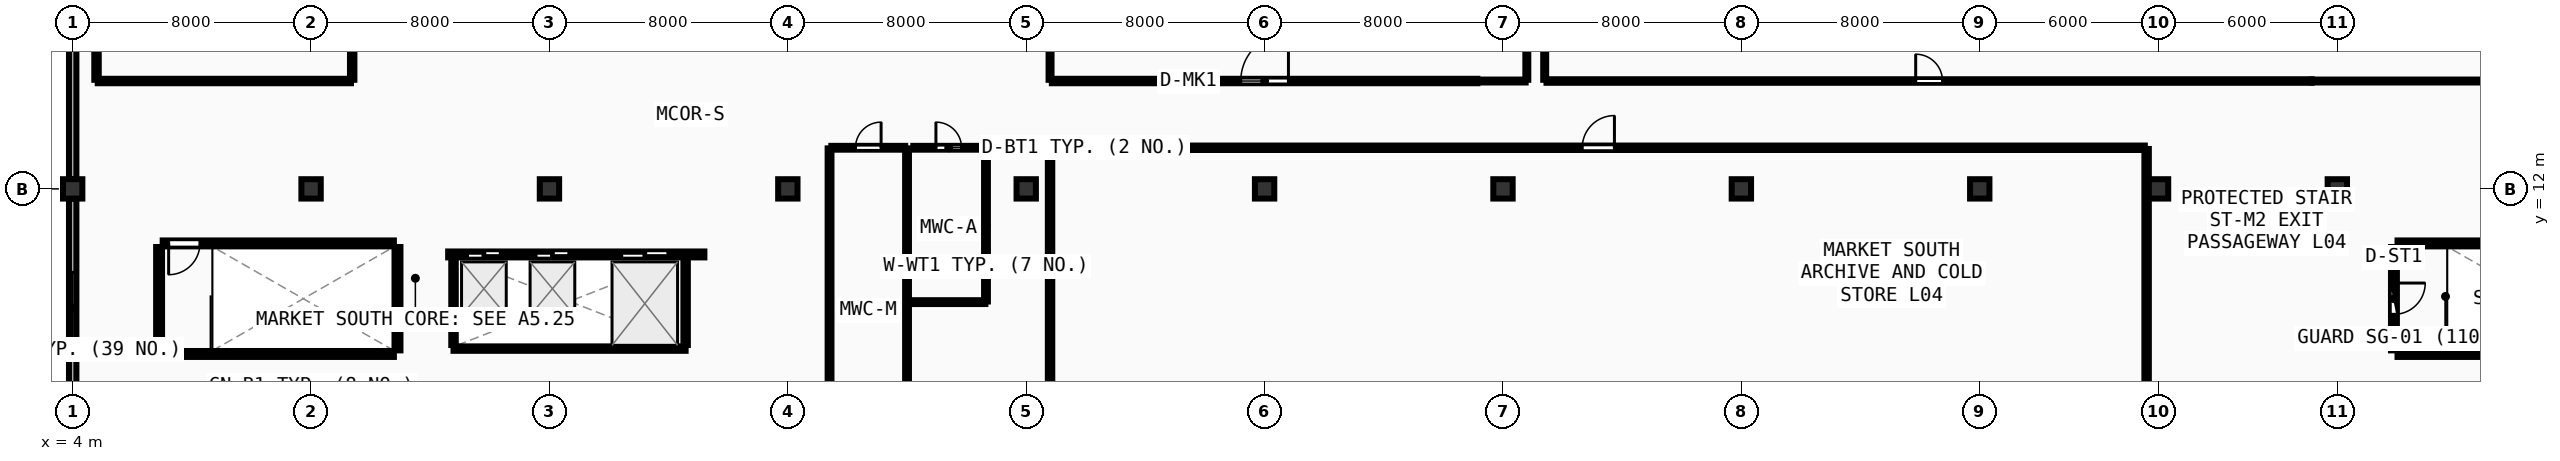
"""IFC4 building model, lengths in metres.
Left out: names, types, materials, properties, quantities, classifications, styles, units other than length and angle.
Written with IfcOpenShell. Run it as: python <this file> out.ifc"""

import sys

from ifc_helpers import new_model, si_unit, direction, frame, frame_2d, origin, origin_2d, place, context, subcontext, project, spatial, rectangle, extrude, element, fill, save


model = new_model("IFC4")
c1 = context("Model", 3, precision=1e-05, world=origin(), true_north=direction((0.0, 1.0)))
c2 = subcontext(c1, "Body", "Model", "MODEL_VIEW")
j1 = project(units=[si_unit("LENGTHUNIT", "METRE"), si_unit("PLANEANGLEUNIT", "RADIAN")], contexts=[c1])
p1 = place(None, origin())
s1 = spatial("IfcSite", under=j1, at=p1, CompositionType="ELEMENT")
p2 = place(p1, origin())
s2 = spatial("IfcBuilding", under=s1, at=p2, CompositionType="ELEMENT")
p3 = place(p2, frame((0.0, 0.0, 18.0)))
s3 = spatial("IfcBuildingStorey", under=s2, at=p3, CompositionType="ELEMENT", Elevation=18.0)
for number, where, z_axis, x_axis in (
    (1, (4.0, 12.0, 0.0), (0.0, 0.0, 1.0), (1.0, 0.0, 0.0)),
    (2, (12.0, 12.0, 0.0), (0.0, 0.0, 1.0), (1.0, 0.0, 0.0)),
    (3, (20.0, 12.0, 0.0), (0.0, 0.0, 1.0), (1.0, 0.0, 0.0)),
    (4, (28.0, 12.0, 0.0), (0.0, 0.0, 1.0), (1.0, 0.0, 0.0)),
    (5, (36.0, 12.0, 0.0), (0.0, 0.0, 1.0), (1.0, 0.0, 0.0)),
    (6, (44.0, 12.0, 0.0), (0.0, 0.0, 1.0), (1.0, 0.0, 0.0)),
    (7, (52.0, 12.0, 0.0), (0.0, 0.0, 1.0), (1.0, 0.0, 0.0)),
    (8, (60.0, 12.0, 0.0), (0.0, 0.0, 1.0), (1.0, 0.0, 0.0)),
    (9, (68.0, 12.0, 0.0), (0.0, 0.0, 1.0), (1.0, 0.0, 0.0)),
    (10, (74.0, 12.0, 0.0), (0.0, 0.0, 1.0), (1.0, 0.0, 0.0)),
    (11, (80.0, 12.0, 0.0), (0.0, 0.0, 1.0), (1.0, 0.0, 0.0)),
):
    element("IfcColumn", number, at=place(p3, frame(where, z_axis=z_axis, x_axis=x_axis)), inside=s3, PredefinedType="COLUMN", context=c2, shape_type="SweptSolid", body=[
        extrude(rectangle(XDim=0.65, YDim=0.65, at=origin_2d()), origin(), (0.0, 0.0, 1.0), 4.5),
    ])
p4 = place(p3, frame((4.0, 19.67, 0.0), z_axis=(0.0, 0.0, 1.0), x_axis=(0.0, -1.0, 0.0)))
e12 = element("IfcWall", 12, at=p4, inside=s3, PredefinedType="SOLIDWALL", context=c2, shape_type="SweptSolid", body=[
    extrude(rectangle(XDim=7.34, YDim=0.25, at=frame_2d((3.67, 0.0))), origin(), (0.0, 0.0, 1.0), 3.44),
])
p5 = place(p3, frame((4.0, 11.67, 0.0), z_axis=(0.0, 0.0, 1.0), x_axis=(0.0, -1.0, 0.0)))
e13 = element("IfcWall", 13, at=p5, inside=s3, PredefinedType="SOLIDWALL", context=c2, shape_type="SweptSolid", body=[
    extrude(rectangle(XDim=7.34, YDim=0.25, at=frame_2d((3.67, 0.0))), origin(), (0.0, 0.0, 1.0), 3.44),
])
p6 = place(p5, frame((2.47, 0.0, 0.95)))
e14 = element("IfcOpeningElement", 14, at=p6, cuts=e13, PredefinedType="OPENING", context=c2, shape_type="SweptSolid", body=[
    extrude(rectangle(XDim=2.4, YDim=1.65, at=frame_2d((1.2, 0.825))), frame((0.0, 0.135, 0.0), z_axis=(0.0, -1.0, 0.0), x_axis=(1.0, 0.0, 0.0)), (0.0, 0.0, 1.0), 0.27),
])
p7 = place(p3, frame((7.02, 6.46, 0.0), z_axis=(0.0, 0.0, 1.0), x_axis=(1.0, 0.0, 0.0)))
e15 = element("IfcWall", 15, at=p7, inside=s3, PredefinedType="SHEAR", context=c2, shape_type="SweptSolid", body=[
    extrude(rectangle(XDim=7.76, YDim=0.2, at=frame_2d((3.88, 0.0))), origin(), (0.0, 0.0, 1.0), 4.26),
])
p8 = place(p3, frame((14.9, 6.58, 0.0), z_axis=(0.0, 0.0, 1.0), x_axis=(0.0, 1.0, 0.0)))
e16 = element("IfcWall", 16, at=p8, inside=s3, PredefinedType="SHEAR", context=c2, shape_type="SweptSolid", body=[
    extrude(rectangle(XDim=3.47, YDim=0.2, at=frame_2d((1.735, 0.0))), origin(), (0.0, 0.0, 1.0), 4.26),
])
p9 = place(p3, frame((14.78, 10.17, 0.0), z_axis=(0.0, 0.0, 1.0), x_axis=(-1.0, 0.0, 0.0)))
e17 = element("IfcWall", 17, at=p9, inside=s3, PredefinedType="SHEAR", context=c2, shape_type="SweptSolid", body=[
    extrude(rectangle(XDim=7.76, YDim=0.2, at=frame_2d((3.88, 0.0))), origin(), (0.0, 0.0, 1.0), 4.26),
])
p10 = place(p9, frame((6.51, 0.0, 0.0)))
e18 = element("IfcOpeningElement", 18, at=p10, cuts=e17, PredefinedType="OPENING", context=c2, shape_type="SweptSolid", body=[
    extrude(rectangle(XDim=1.05, YDim=2.1, at=frame_2d((0.525, 1.05))), frame((0.0, 0.11, 0.0), z_axis=(0.0, -1.0, 0.0), x_axis=(1.0, 0.0, 0.0)), (0.0, 0.0, 1.0), 0.22),
])
p11 = place(p3, frame((6.9, 10.05, 0.0), z_axis=(0.0, 0.0, 1.0), x_axis=(0.0, -1.0, 0.0)))
e19 = element("IfcWall", 19, at=p11, inside=s3, PredefinedType="SHEAR", context=c2, shape_type="SweptSolid", body=[
    extrude(rectangle(XDim=3.47, YDim=0.2, at=frame_2d((1.735, 0.0))), origin(), (0.0, 0.0, 1.0), 4.26),
])
for number, where, z_axis, x_axis in (
    (20, (82.02, 6.46, 0.0), (0.0, 0.0, 1.0), (1.0, 0.0, 0.0)),
    (21, (89.78, 10.17, 0.0), (0.0, 0.0, 1.0), (-1.0, 0.0, 0.0)),
):
    element("IfcWall", number, at=place(p3, frame(where, z_axis=z_axis, x_axis=x_axis)), inside=s3, PredefinedType="SHEAR", context=c2, shape_type="SweptSolid", body=[
        extrude(rectangle(XDim=7.76, YDim=0.2, at=frame_2d((3.88, 0.0))), origin(), (0.0, 0.0, 1.0), 4.26),
    ])
p12 = place(p3, frame((81.9, 10.05, 0.0), z_axis=(0.0, 0.0, 1.0), x_axis=(0.0, -1.0, 0.0)))
e22 = element("IfcWall", 22, at=p12, inside=s3, PredefinedType="SHEAR", context=c2, shape_type="SweptSolid", body=[
    extrude(rectangle(XDim=3.47, YDim=0.2, at=frame_2d((1.735, 0.0))), origin(), (0.0, 0.0, 1.0), 4.26),
])
p13 = place(p12, frame((1.21, 0.0, 0.0)))
e23 = element("IfcOpeningElement", 23, at=p13, cuts=e22, PredefinedType="OPENING", context=c2, shape_type="SweptSolid", body=[
    extrude(rectangle(XDim=1.05, YDim=2.1, at=frame_2d((0.525, 1.05))), frame((0.0, 0.11, 0.0), z_axis=(0.0, -1.0, 0.0), x_axis=(1.0, 0.0, 0.0)), (0.0, 0.0, 1.0), 0.22),
])
p14 = place(p3, frame((16.6, 9.8, 0.0), z_axis=(0.0, 0.0, 1.0), x_axis=(1.0, 0.0, 0.0)))
e24 = element("IfcWall", 24, at=p14, inside=s3, PredefinedType="SOLIDWALL", context=c2, shape_type="SweptSolid", body=[
    extrude(rectangle(XDim=8.6, YDim=0.2, at=frame_2d((4.3, 0.0))), origin(), (0.0, 0.0, 1.0), 3.445),
])
p15 = place(p14, frame((0.65, 0.0, 0.0)))
e25 = element("IfcOpeningElement", 25, at=p15, cuts=e24, PredefinedType="OPENING", context=c2, shape_type="SweptSolid", body=[
    extrude(rectangle(XDim=1.1, YDim=2.1, at=frame_2d((0.55, 1.05))), frame((0.0, 0.11, 0.0), z_axis=(0.0, -1.0, 0.0), x_axis=(1.0, 0.0, 0.0)), (0.0, 0.0, 1.0), 0.22),
])
p16 = place(p14, frame((2.95, 0.0, 0.0)))
e26 = element("IfcOpeningElement", 26, at=p16, cuts=e24, PredefinedType="OPENING", context=c2, shape_type="SweptSolid", body=[
    extrude(rectangle(XDim=1.1, YDim=2.1, at=frame_2d((0.55, 1.05))), frame((0.0, 0.11, 0.0), z_axis=(0.0, -1.0, 0.0), x_axis=(1.0, 0.0, 0.0)), (0.0, 0.0, 1.0), 0.22),
])
p17 = place(p14, frame((5.825, 0.0, 0.0)))
e27 = element("IfcOpeningElement", 27, at=p17, cuts=e24, PredefinedType="OPENING", context=c2, shape_type="SweptSolid", body=[
    extrude(rectangle(XDim=1.55, YDim=2.2, at=frame_2d((0.775, 1.1))), frame((0.0, 0.11, 0.0), z_axis=(0.0, -1.0, 0.0), x_axis=(1.0, 0.0, 0.0)), (0.0, 0.0, 1.0), 0.22),
])
p18 = place(p3, frame((16.78, 6.64, 0.0), z_axis=(0.0, 0.0, 1.0), x_axis=(1.0, 0.0, 0.0)))
e28 = element("IfcWall", 28, at=p18, inside=s3, PredefinedType="PARTITIONING", context=c2, shape_type="SweptSolid", body=[
    extrude(rectangle(XDim=7.79, YDim=0.15, at=frame_2d((3.895, 0.0))), origin(), (0.0, 0.0, 1.0), 3.445),
])
for number, where, z_axis, x_axis in (
    (29, (16.78, 6.76, 0.0), (0.0, 0.0, 1.0), (0.0, 1.0, 0.0)),
    (30, (24.57, 6.76, 0.0), (0.0, 0.0, 1.0), (0.0, 1.0, 0.0)),
):
    element("IfcWall", number, at=place(p3, frame(where, z_axis=z_axis, x_axis=x_axis)), inside=s3, PredefinedType="PARTITIONING", context=c2, shape_type="SweptSolid", body=[
        extrude(rectangle(XDim=2.91, YDim=0.15, at=frame_2d((1.455, 0.0))), origin(), (0.0, 0.0, 1.0), 4.25),
    ])
p19 = place(p3, frame((29.46, 13.38, 0.0), z_axis=(0.0, 0.0, 1.0), x_axis=(1.0, 0.0, 0.0)))
e31 = element("IfcWall", 31, at=p19, inside=s3, PredefinedType="PLUMBINGWALL", context=c2, shape_type="SweptSolid", body=[
    extrude(rectangle(XDim=2.48, YDim=0.13, at=frame_2d((1.24, 0.0))), origin(), (0.0, 0.0, 1.0), 4.23),
])
p20 = place(p19, frame((0.81, 0.0, 0.0)))
e32 = element("IfcOpeningElement", 32, at=p20, cuts=e31, PredefinedType="OPENING", context=c2, shape_type="SweptSolid", body=[
    extrude(rectangle(XDim=0.86, YDim=2.05, at=frame_2d((0.43, 1.025))), frame((0.0, 0.075, 0.0), z_axis=(0.0, -1.0, 0.0), x_axis=(1.0, 0.0, 0.0)), (0.0, 0.0, 1.0), 0.15),
])
p21 = place(p3, frame((32.21, 13.38, 0.0), z_axis=(0.0, 0.0, 1.0), x_axis=(1.0, 0.0, 0.0)))
e33 = element("IfcWall", 33, at=p21, inside=s3, PredefinedType="PLUMBINGWALL", context=c2, shape_type="SweptSolid", body=[
    extrude(rectangle(XDim=2.38, YDim=0.13, at=frame_2d((1.19, 0.0))), origin(), (0.0, 0.0, 1.0), 4.23),
])
p22 = place(p21, frame((0.76, 0.0, 0.0)))
e34 = element("IfcOpeningElement", 34, at=p22, cuts=e33, PredefinedType="OPENING", context=c2, shape_type="SweptSolid", body=[
    extrude(rectangle(XDim=0.86, YDim=2.05, at=frame_2d((0.43, 1.025))), frame((0.0, 0.075, 0.0), z_axis=(0.0, -1.0, 0.0), x_axis=(1.0, 0.0, 0.0)), (0.0, 0.0, 1.0), 0.15),
])
p23 = place(p3, frame((36.86, 15.62, 0.0), z_axis=(0.0, 0.0, 1.0), x_axis=(1.0, 0.0, 0.0)))
e35 = element("IfcWall", 35, at=p23, inside=s3, PredefinedType="PARTITIONING", context=c2, shape_type="SweptSolid", body=[
    extrude(rectangle(XDim=14.28, YDim=0.15, at=frame_2d((7.14, 0.0))), origin(), (0.0, 0.0, 1.0), 3.445),
])
p24 = place(p23, frame((6.34, 0.0, 0.0)))
e36 = element("IfcOpeningElement", 36, at=p24, cuts=e35, PredefinedType="OPENING", context=c2, shape_type="SweptSolid", body=[
    extrude(rectangle(XDim=1.6, YDim=2.15, at=frame_2d((0.8, 1.075))), frame((0.0, 0.085, 0.0), z_axis=(0.0, -1.0, 0.0), x_axis=(1.0, 0.0, 0.0)), (0.0, 0.0, 1.0), 0.17),
])
p25 = place(p3, frame((53.46, 15.62, 0.0), z_axis=(0.0, 0.0, 1.0), x_axis=(1.0, 0.0, 0.0)))
e37 = element("IfcWall", 37, at=p25, inside=s3, PredefinedType="PARTITIONING", context=c2, shape_type="SweptSolid", body=[
    extrude(rectangle(XDim=25.68, YDim=0.12, at=frame_2d((12.84, 0.0))), origin(), (0.0, 0.0, 1.0), 3.445),
])
p26 = place(p25, frame((12.39, 0.0, 0.0)))
e38 = element("IfcOpeningElement", 38, at=p26, cuts=e37, PredefinedType="OPENING", context=c2, shape_type="SweptSolid", body=[
    extrude(rectangle(XDim=0.9, YDim=2.08, at=frame_2d((0.45, 1.04))), frame((0.0, 0.07, 0.0), z_axis=(0.0, -1.0, 0.0), x_axis=(1.0, 0.0, 0.0)), (0.0, 0.0, 1.0), 0.14),
])
p27 = place(p3, frame((36.86, 13.38, 0.0), z_axis=(0.0, 0.0, 1.0), x_axis=(1.0, 0.0, 0.0)))
e39 = element("IfcWall", 39, at=p27, inside=s3, PredefinedType="PARTITIONING", context=c2, shape_type="SweptSolid", body=[
    extrude(rectangle(XDim=36.68, YDim=0.15, at=frame_2d((18.34, 0.0))), origin(), (0.0, 0.0, 1.0), 3.445),
])
p28 = place(p27, frame((17.8, 0.0, 0.0)))
e40 = element("IfcOpeningElement", 40, at=p28, cuts=e39, PredefinedType="OPENING", context=c2, shape_type="SweptSolid", body=[
    extrude(rectangle(XDim=1.08, YDim=2.1, at=frame_2d((0.54, 1.05))), frame((0.0, 0.085, 0.0), z_axis=(0.0, -1.0, 0.0), x_axis=(1.0, 0.0, 0.0)), (0.0, 0.0, 1.0), 0.17),
])
for number, where, z_axis, x_axis in (
    (41, (32.0, 5.22, 0.0), (0.0, 0.0, 1.0), (0.0, 1.0, 0.0)),
    (42, (29.4, 13.36, 0.0), (0.0, 0.0, 1.0), (0.0, -1.0, 0.0)),
):
    element("IfcWall", number, at=place(p3, frame(where, z_axis=z_axis, x_axis=x_axis)), inside=s3, PredefinedType="PLUMBINGWALL", context=c2, shape_type="SweptSolid", body=[
        extrude(rectangle(XDim=8.14, YDim=0.13, at=frame_2d((4.07, 0.0))), origin(), (0.0, 0.0, 1.0), 3.445),
    ])
p29 = place(p3, frame((32.17, 8.2, 0.0), z_axis=(0.0, 0.0, 1.0), x_axis=(1.0, 0.0, 0.0)))
e43 = element("IfcWall", 43, at=p29, inside=s3, PredefinedType="PLUMBINGWALL", context=c2, shape_type="SweptSolid", body=[
    extrude(rectangle(XDim=2.46, YDim=0.13, at=frame_2d((1.23, 0.0))), origin(), (0.0, 0.0, 1.0), 4.23),
])
p30 = place(p3, frame((34.65, 8.22, 0.0), z_axis=(0.0, 0.0, 1.0), x_axis=(0.0, 1.0, 0.0)))
e44 = element("IfcWall", 44, at=p30, inside=s3, PredefinedType="PLUMBINGWALL", context=c2, shape_type="SweptSolid", body=[
    extrude(rectangle(XDim=5.14, YDim=0.13, at=frame_2d((2.57, 0.0))), origin(), (0.0, 0.0, 1.0), 3.445),
])
p31 = place(p3, frame((51.14, 15.62, 0.0), z_axis=(0.0, 0.0, 1.0), x_axis=(1.0, 0.0, 0.0)))
e45 = element("IfcWall", 45, at=p31, inside=s3, PredefinedType="PARTITIONING", context=c2, shape_type="SweptSolid", body=[
    extrude(rectangle(XDim=1.62, YDim=0.1, at=frame_2d((0.81, 0.0))), origin(), (0.0, 0.0, 1.0), 3.445),
])
for number, where, z_axis, x_axis in (
    (46, (52.8, 15.66, 0.0), (0.0, 0.0, 1.0), (0.0, 1.0, 0.0)),
    (47, (36.8, 25.16, 0.0), (0.0, 0.0, 1.0), (0.0, -1.0, 0.0)),
):
    element("IfcWall", number, at=place(p3, frame(where, z_axis=z_axis, x_axis=x_axis)), inside=s3, PredefinedType="PARTITIONING", context=c2, shape_type="SweptSolid", body=[
        extrude(rectangle(XDim=9.5, YDim=0.1, at=frame_2d((4.75, 0.0))), origin(), (0.0, 0.0, 1.0), 3.445),
    ])
p32 = place(p3, frame((79.14, 15.62, 0.0), z_axis=(0.0, 0.0, 1.0), x_axis=(1.0, 0.0, 0.0)))
e48 = element("IfcWall", 48, at=p32, inside=s3, PredefinedType="PARTITIONING", context=c2, shape_type="SweptSolid", body=[
    extrude(rectangle(XDim=16.02, YDim=0.1, at=frame_2d((8.01, 0.0))), origin(), (0.0, 0.0, 1.0), 3.445),
])
p33 = place(p3, frame((53.4, 25.16, 0.0), z_axis=(0.0, 0.0, 1.0), x_axis=(0.0, -1.0, 0.0)))
e49 = element("IfcWall", 49, at=p33, inside=s3, PredefinedType="PARTITIONING", context=c2, shape_type="SweptSolid", body=[
    extrude(rectangle(XDim=9.5, YDim=0.1, at=frame_2d((4.75, 0.0))), origin(), (0.0, 0.0, 1.0), 3.445),
])
for number, where, z_axis, x_axis in (
    (50, (73.6, 4.84, 0.0), (0.0, 0.0, 1.0), (0.0, 1.0, 0.0)),
    (51, (36.8, 13.34, 0.0), (0.0, 0.0, 1.0), (0.0, -1.0, 0.0)),
    (52, (4.84, 15.62, 0.0), (0.0, 0.0, 1.0), (1.0, 0.0, 0.0)),
):
    element("IfcWall", number, at=place(p3, frame(where, z_axis=z_axis, x_axis=x_axis)), inside=s3, PredefinedType="PARTITIONING", context=c2, shape_type="SweptSolid", body=[
        extrude(rectangle(XDim=8.5, YDim=0.15, at=frame_2d((4.25, 0.0))), origin(), (0.0, 0.0, 1.0), 3.445),
    ])
p34 = place(p3, frame((13.38, 15.66, 0.0), z_axis=(0.0, 0.0, 1.0), x_axis=(0.0, 1.0, 0.0)))
e53 = element("IfcWall", 53, at=p34, inside=s3, PredefinedType="PARTITIONING", context=c2, shape_type="SweptSolid", body=[
    extrude(rectangle(XDim=5.8, YDim=0.15, at=frame_2d((2.9, 0.0))), origin(), (0.0, 0.0, 1.0), 3.445),
])
p35 = place(p3, frame((4.8, 65.16, 0.0), z_axis=(0.0, 0.0, 1.0), x_axis=(0.0, -1.0, 0.0)))
e54 = element("IfcWall", 54, at=p35, inside=s3, PredefinedType="PARTITIONING", context=c2, shape_type="SweptSolid", body=[
    extrude(rectangle(XDim=49.5, YDim=0.15, at=frame_2d((24.75, 0.0))), origin(), (0.0, 0.0, 1.0), 3.445),
])
p36 = place(p6, origin())
e55 = element("IfcWindow", 55, at=p36, inside=s3, PartitioningType="SINGLE_PANEL", PredefinedType="WINDOW", context=c2, shape_type="SweptSolid", body=[
    extrude(rectangle(XDim=2.4, YDim=1.65, at=frame_2d((1.2, 0.825))), frame((0.0, 0.03, 0.0), z_axis=(0.0, -1.0, 0.0), x_axis=(1.0, 0.0, 0.0)), (0.0, 0.0, 1.0), 0.06),
])
fill(e14, e55)
p37 = place(p10, origin())
e56 = element("IfcDoor", 56, at=p37, inside=s3, OperationType="SINGLE_SWING_RIGHT", PredefinedType="DOOR", context=c2, shape_type="SweptSolid", body=[
    extrude(rectangle(XDim=1.05, YDim=2.1, at=frame_2d((0.525, 1.05))), frame((0.0, 0.025, 0.0), z_axis=(0.0, -1.0, 0.0), x_axis=(1.0, 0.0, 0.0)), (0.0, 0.0, 1.0), 0.05),
])
fill(e18, e56)
p38 = place(p13, origin())
e57 = element("IfcDoor", 57, at=p38, inside=s3, OperationType="SINGLE_SWING_LEFT", PredefinedType="DOOR", context=c2, shape_type="SweptSolid", body=[
    extrude(rectangle(XDim=1.05, YDim=2.1, at=frame_2d((0.525, 1.05))), frame((0.0, 0.025, 0.0), z_axis=(0.0, -1.0, 0.0), x_axis=(1.0, 0.0, 0.0)), (0.0, 0.0, 1.0), 0.05),
])
fill(e23, e57)
p39 = place(p15, origin())
e58 = element("IfcDoor", 58, at=p39, inside=s3, OperationType="DOUBLE_DOOR_SLIDING", PredefinedType="DOOR", context=c2, shape_type="SweptSolid", body=[
    extrude(rectangle(XDim=1.1, YDim=2.1, at=frame_2d((0.55, 1.05))), frame((0.0, 0.025, 0.0), z_axis=(0.0, -1.0, 0.0), x_axis=(1.0, 0.0, 0.0)), (0.0, 0.0, 1.0), 0.05),
])
fill(e25, e58)
p40 = place(p16, origin())
e59 = element("IfcDoor", 59, at=p40, inside=s3, OperationType="DOUBLE_DOOR_SLIDING", PredefinedType="DOOR", context=c2, shape_type="SweptSolid", body=[
    extrude(rectangle(XDim=1.1, YDim=2.1, at=frame_2d((0.55, 1.05))), frame((0.0, 0.025, 0.0), z_axis=(0.0, -1.0, 0.0), x_axis=(1.0, 0.0, 0.0)), (0.0, 0.0, 1.0), 0.05),
])
fill(e26, e59)
p41 = place(p17, origin())
e60 = element("IfcDoor", 60, at=p41, inside=s3, OperationType="DOUBLE_DOOR_SLIDING", PredefinedType="DOOR", context=c2, shape_type="SweptSolid", body=[
    extrude(rectangle(XDim=1.55, YDim=2.2, at=frame_2d((0.775, 1.1))), frame((0.0, 0.025, 0.0), z_axis=(0.0, -1.0, 0.0), x_axis=(1.0, 0.0, 0.0)), (0.0, 0.0, 1.0), 0.05),
])
fill(e27, e60)
p42 = place(p20, origin())
e61 = element("IfcDoor", 61, at=p42, inside=s3, OperationType="SINGLE_SWING_RIGHT", PredefinedType="DOOR", context=c2, shape_type="SweptSolid", body=[
    extrude(rectangle(XDim=0.86, YDim=2.05, at=frame_2d((0.43, 1.025))), frame((0.0, 0.025, 0.0), z_axis=(0.0, -1.0, 0.0), x_axis=(1.0, 0.0, 0.0)), (0.0, 0.0, 1.0), 0.05),
])
fill(e32, e61)
p43 = place(p22, origin())
e62 = element("IfcDoor", 62, at=p43, inside=s3, OperationType="SINGLE_SWING_LEFT", PredefinedType="DOOR", context=c2, shape_type="SweptSolid", body=[
    extrude(rectangle(XDim=0.86, YDim=2.05, at=frame_2d((0.43, 1.025))), frame((0.0, 0.025, 0.0), z_axis=(0.0, -1.0, 0.0), x_axis=(1.0, 0.0, 0.0)), (0.0, 0.0, 1.0), 0.05),
])
fill(e34, e62)
p44 = place(p24, origin())
e63 = element("IfcDoor", 63, at=p44, inside=s3, OperationType="SINGLE_SWING_RIGHT", PredefinedType="DOOR", context=c2, shape_type="SweptSolid", body=[
    extrude(rectangle(XDim=1.6, YDim=2.15, at=frame_2d((0.8, 1.075))), frame((0.0, 0.025, 0.0), z_axis=(0.0, -1.0, 0.0), x_axis=(1.0, 0.0, 0.0)), (0.0, 0.0, 1.0), 0.05),
])
fill(e36, e63)
p45 = place(p26, origin())
e64 = element("IfcDoor", 64, at=p45, inside=s3, OperationType="SINGLE_SWING_LEFT", PredefinedType="DOOR", context=c2, shape_type="SweptSolid", body=[
    extrude(rectangle(XDim=0.9, YDim=2.08, at=frame_2d((0.45, 1.04))), frame((0.0, 0.025, 0.0), z_axis=(0.0, -1.0, 0.0), x_axis=(1.0, 0.0, 0.0)), (0.0, 0.0, 1.0), 0.05),
])
fill(e38, e64)
p46 = place(p28, origin())
e65 = element("IfcDoor", 65, at=p46, inside=s3, OperationType="SINGLE_SWING_RIGHT", PredefinedType="DOOR", context=c2, shape_type="SweptSolid", body=[
    extrude(rectangle(XDim=1.08, YDim=2.1, at=frame_2d((0.54, 1.05))), frame((0.0, 0.025, 0.0), z_axis=(0.0, -1.0, 0.0), x_axis=(1.0, 0.0, 0.0)), (0.0, 0.0, 1.0), 0.05),
])
fill(e40, e65)
save(model, sys.argv[1])
